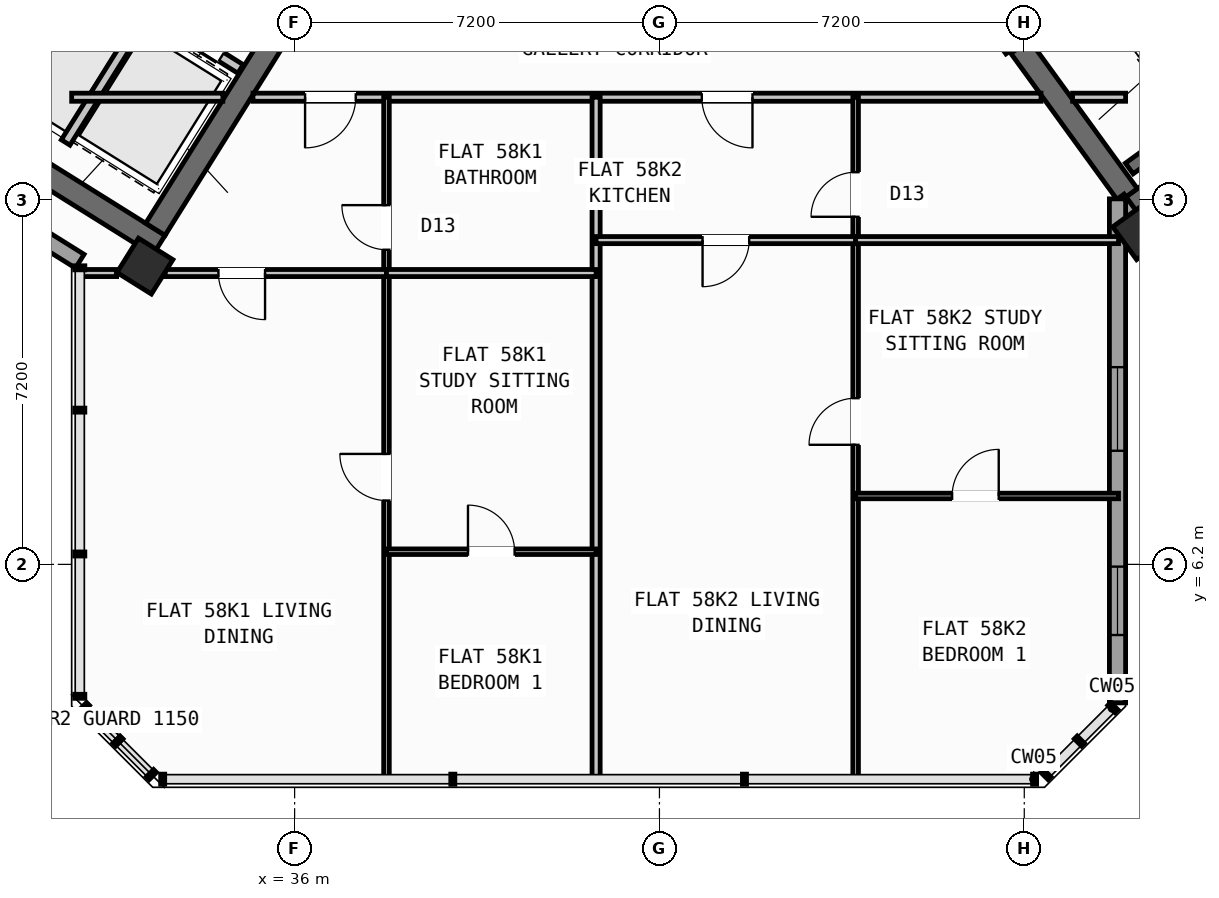
"""IFC4 building model, lengths in metres.
Left out: names, types, materials, properties, quantities, classifications, styles, units other than length and angle.
Written with IfcOpenShell. Run it as: python <this file> out.ifc"""

import sys

from ifc_helpers import new_model, si_unit, direction, frame, frame_2d, origin, origin_2d, place, context, subcontext, project, spatial, rectangle, hollow_rectangle, extrude, source, transform, mapped, element, fill, save


model = new_model("IFC4")
c1 = context("Model", 3, precision=1e-05, world=origin(), true_north=direction((0.0, 1.0)))
c2 = subcontext(c1, "Body", "Model", "MODEL_VIEW")
j1 = project(units=[si_unit("LENGTHUNIT", "METRE"), si_unit("PLANEANGLEUNIT", "RADIAN")], contexts=[c1])
p1 = place(None, origin())
s1 = spatial("IfcSite", under=j1, at=p1, CompositionType="ELEMENT")
p2 = place(p1, origin())
s2 = spatial("IfcBuilding", under=s1, at=p2, CompositionType="ELEMENT")
p3 = place(p2, frame((0.0, 0.0, 229.2)))
s3 = spatial("IfcBuildingStorey", under=s2, at=p3, CompositionType="ELEMENT", Elevation=229.2)
p4 = place(p3, frame((33.324, 12.503, 0.0), z_axis=(0.0, 0.0, 1.0), x_axis=(-0.848043529849, 0.529926571782, 0.0)))
e1 = element("IfcWall", 1, at=p4, inside=s3, PredefinedType="SHEAR", context=c2, shape_type="SweptSolid", body=[
    extrude(rectangle(XDim=13.04, YDim=0.45, at=frame_2d((6.52, 0.0))), origin(), (0.0, 0.0, 1.0), 4.22),
])
p5 = place(p3, frame((36.683, 18.304, 0.0), z_axis=(0.0, 0.0, 1.0), x_axis=(-0.529904039071, -0.848057609704, 0.0)))
e2 = element("IfcWall", 2, at=p5, inside=s3, PredefinedType="SHEAR", context=c2, shape_type="SweptSolid", body=[
    extrude(rectangle(XDim=6.475, YDim=0.45, at=frame_2d((3.238, 0.0))), origin(), (0.0, 0.0, 1.0), 4.22),
])
p6 = place(p3, frame((52.399, 13.169, 0.0), z_axis=(0.0, 0.0, 1.0), x_axis=(0.809022352778, 0.587777877013, 0.0)))
e3 = element("IfcWall", 3, at=p6, inside=s3, PredefinedType="SHEAR", context=c2, shape_type="SweptSolid", body=[
    extrude(rectangle(XDim=12.24, YDim=0.45, at=frame_2d((6.12, 0.0))), origin(), (0.0, 0.0, 1.0), 4.22),
])
p7 = place(p3, frame((52.449, 13.483, 0.0), z_axis=(0.0, 0.0, 1.0), x_axis=(-0.587819244441, 0.808992296542, 0.0)))
e4 = element("IfcWall", 4, at=p7, inside=s3, PredefinedType="SHEAR", context=c2, shape_type="SweptSolid", body=[
    extrude(rectangle(XDim=3.625, YDim=0.45, at=frame_2d((1.812, 0.0))), origin(), (0.0, 0.0, 1.0), 4.22),
])
m1 = source(origin(), c2, "Body", "SweptSolid", [
    extrude(hollow_rectangle(XDim=0.8, YDim=0.8, WallThickness=0.032, at=origin_2d()), origin(), (0.0, 0.0, 1.0), 4.5),
])
for number, where, z_axis, x_axis in (
    (5, (33.046, 12.087, 0.0), (0.0, 0.0, 1.0), (-0.848, 0.53, 0.0)),
    (6, (52.705, 12.773, 0.0), (0.0, 0.0, 1.0), (0.809, 0.588, 0.0)),
):
    element("IfcColumn", number, at=place(p3, frame(where, z_axis=z_axis, x_axis=x_axis)), inside=s3, PredefinedType="COLUMN", context=c2, shape_type="MappedRepresentation", body=[
        mapped(m1, transform((0.0, 0.0, 0.0), scale=1.0)),
    ])
p8 = place(p3, frame((31.76, 12.183, 0.0), z_axis=(0.0, 0.0, 1.0), x_axis=(-0.848047074256, 0.529920899612, 0.0)))
e7 = element("IfcWall", 7, at=p8, inside=s3, PredefinedType="STANDARD", context=c2, shape_type="SweptSolid", body=[
    extrude(rectangle(XDim=30.652, YDim=0.32, at=frame_2d((15.326, 0.0))), origin(), (0.0, 0.0, 1.0), 4.22),
])
p9 = place(p8, frame((14.966, 0.0, 0.0)))
e8 = element("IfcOpeningElement", 8, at=p9, cuts=e7, PredefinedType="OPENING", context=c2, shape_type="SweptSolid", body=[
    extrude(rectangle(XDim=1.2, YDim=2.15, at=frame_2d((0.6, 1.075))), frame((0.0, 0.17, 0.0), z_axis=(0.0, -1.0, 0.0), x_axis=(1.0, 0.0, 0.0)), (0.0, 0.0, 1.0), 0.34),
])
p10 = place(p8, frame((2.096, 0.0, 0.9)))
e9 = element("IfcOpeningElement", 9, at=p10, cuts=e7, PredefinedType="OPENING", context=c2, shape_type="SweptSolid", body=[
    extrude(rectangle(XDim=1.65, YDim=1.45, at=frame_2d((0.825, 0.725))), frame((0.0, 0.17, 0.0), z_axis=(0.0, -1.0, 0.0), x_axis=(1.0, 0.0, 0.0)), (0.0, 0.0, 1.0), 0.34),
])
p11 = place(p8, frame((6.771, 0.0, 0.9)))
e10 = element("IfcOpeningElement", 10, at=p11, cuts=e7, PredefinedType="OPENING", context=c2, shape_type="SweptSolid", body=[
    extrude(rectangle(XDim=1.65, YDim=1.45, at=frame_2d((0.825, 0.725))), frame((0.0, 0.17, 0.0), z_axis=(0.0, -1.0, 0.0), x_axis=(1.0, 0.0, 0.0)), (0.0, 0.0, 1.0), 0.34),
])
p12 = place(p8, frame((20.283, 0.0, 0.95)))
e11 = element("IfcOpeningElement", 11, at=p12, cuts=e7, PredefinedType="OPENING", context=c2, shape_type="SweptSolid", body=[
    extrude(rectangle(XDim=1.95, YDim=1.35, at=frame_2d((0.975, 0.675))), frame((0.0, 0.17, 0.0), z_axis=(0.0, -1.0, 0.0), x_axis=(1.0, 0.0, 0.0)), (0.0, 0.0, 1.0), 0.34),
])
p13 = place(p8, frame((27.208, 0.0, 1.0)))
e12 = element("IfcOpeningElement", 12, at=p13, cuts=e7, PredefinedType="OPENING", context=c2, shape_type="SweptSolid", body=[
    extrude(rectangle(XDim=0.9, YDim=1.25, at=frame_2d((0.45, 0.625))), frame((0.0, 0.17, 0.0), z_axis=(0.0, -1.0, 0.0), x_axis=(1.0, 0.0, 0.0)), (0.0, 0.0, 1.0), 0.34),
])
p14 = place(p3, frame((52.937, 12.455, 0.0), z_axis=(0.0, 0.0, 1.0), x_axis=(-0.587706324018, 0.809074333241, 0.0)))
e13 = element("IfcWall", 13, at=p14, inside=s3, PredefinedType="STANDARD", context=c2, shape_type="SweptSolid", body=[
    extrude(rectangle(XDim=1.186, YDim=0.32, at=frame_2d((0.593, 0.0))), origin(), (0.0, 0.0, 1.0), 2.395),
])
p15 = place(p3, frame((52.24, 13.414, 0.0), z_axis=(0.0, 0.0, 1.0), x_axis=(0.0, -1.0, 0.0)))
e14 = element("IfcWall", 14, at=p15, inside=s3, PredefinedType="STANDARD", context=c2, shape_type="SweptSolid", body=[
    extrude(rectangle(XDim=9.948, YDim=0.32, at=frame_2d((4.974, 0.0))), origin(), (0.0, 0.0, 1.0), 4.22),
])
p16 = place(p15, frame((3.322, 0.0, 0.9)))
e15 = element("IfcOpeningElement", 15, at=p16, cuts=e14, PredefinedType="OPENING", context=c2, shape_type="SweptSolid", body=[
    extrude(rectangle(XDim=1.65, YDim=1.45, at=frame_2d((0.825, 0.725))), frame((0.0, 0.17, 0.0), z_axis=(0.0, -1.0, 0.0), x_axis=(1.0, 0.0, 0.0)), (0.0, 0.0, 1.0), 0.34),
])
p17 = place(p15, frame((7.258, 0.0, 0.9)))
e16 = element("IfcOpeningElement", 16, at=p17, cuts=e14, PredefinedType="OPENING", context=c2, shape_type="SweptSolid", body=[
    extrude(rectangle(XDim=1.35, YDim=1.45, at=frame_2d((0.675, 0.725))), frame((0.0, 0.17, 0.0), z_axis=(0.0, -1.0, 0.0), x_axis=(1.0, 0.0, 0.0)), (0.0, 0.0, 1.0), 0.34),
])
p18 = place(p3, frame((31.288, 18.256, 0.0), z_axis=(0.0, 0.0, 1.0), x_axis=(-0.529943379326, -0.848033026897, 0.0)))
e17 = element("IfcWall", 17, at=p18, inside=s3, PredefinedType="SHEAR", context=c2, shape_type="SweptSolid", body=[
    extrude(rectangle(XDim=3.16, YDim=0.26, at=frame_2d((1.58, 0.0))), origin(), (0.0, 0.0, 1.0), 4.22),
])
p19 = place(p3, frame((34.933, 15.978, 0.0), z_axis=(0.0, 0.0, 1.0), x_axis=(-0.848055739377, 0.529907032327, 0.0)))
e18 = element("IfcWall", 18, at=p19, inside=s3, PredefinedType="STANDARD", context=c2, shape_type="SweptSolid", body=[
    extrude(rectangle(XDim=4.298, YDim=0.2, at=frame_2d((2.149, 0.0))), origin(), (0.0, 0.0, 1.0), 4.21),
])
p20 = place(p19, frame((0.448, 0.0, 0.0)))
e19 = element("IfcOpeningElement", 19, at=p20, cuts=e18, PredefinedType="OPENING", context=c2, shape_type="SweptSolid", body=[
    extrude(rectangle(XDim=1.3, YDim=2.2, at=frame_2d((0.65, 1.1))), frame((0.0, 0.11, 0.0), z_axis=(0.0, -1.0, 0.0), x_axis=(1.0, 0.0, 0.0)), (0.0, 0.0, 1.0), 0.22),
])
p21 = place(p19, frame((2.523, 0.0, 0.0)))
e20 = element("IfcOpeningElement", 20, at=p21, cuts=e18, PredefinedType="OPENING", context=c2, shape_type="SweptSolid", body=[
    extrude(rectangle(XDim=1.45, YDim=2.25, at=frame_2d((0.725, 1.125))), frame((0.0, 0.11, 0.0), z_axis=(0.0, -1.0, 0.0), x_axis=(1.0, 0.0, 0.0)), (0.0, 0.0, 1.0), 0.22),
])
p22 = place(p3, frame((33.029, 17.003, 0.0), z_axis=(0.0, 0.0, 1.0), x_axis=(-0.529916267533, -0.848049968695, 0.0)))
e21 = element("IfcWall", 21, at=p22, inside=s3, PredefinedType="STANDARD", context=c2, shape_type="SweptSolid", body=[
    extrude(rectangle(XDim=2.92, YDim=0.2, at=frame_2d((1.46, 0.0))), origin(), (0.0, 0.0, 1.0), 4.21),
])
p23 = place(p3, frame((52.472, 14.013, 0.0), z_axis=(0.0, 0.0, 1.0), x_axis=(0.809028366311, 0.587769599847, 0.0)))
e22 = element("IfcWall", 22, at=p23, inside=s3, PredefinedType="SHEAR", context=c2, shape_type="SweptSolid", body=[
    extrude(rectangle(XDim=7.33, YDim=0.26, at=frame_2d((3.665, 0.0))), origin(), (0.0, 0.0, 1.0), 4.22),
])
p24 = place(p3, frame((31.6, 15.42, 0.0), z_axis=(0.0, 0.0, 1.0), x_axis=(1.0, 0.0, 0.0)))
e23 = element("IfcWall", 23, at=p24, inside=s3, PredefinedType="PARTITIONING", context=c2, shape_type="SweptSolid", body=[
    extrude(rectangle(XDim=2.984, YDim=0.16, at=frame_2d((1.492, 0.0))), origin(), (0.0, 0.0, 1.0), 4.21),
])
p25 = place(p3, frame((35.178, 15.42, 0.0), z_axis=(0.0, 0.0, 1.0), x_axis=(1.0, 0.0, 0.0)))
e24 = element("IfcWall", 24, at=p25, inside=s3, PredefinedType="PARTITIONING", context=c2, shape_type="SweptSolid", body=[
    extrude(rectangle(XDim=15.552, YDim=0.16, at=frame_2d((7.776, 0.0))), origin(), (0.0, 0.0, 1.0), 4.21),
])
p26 = place(p25, frame((1.028, 0.0, 0.0)))
e25 = element("IfcOpeningElement", 25, at=p26, cuts=e24, PredefinedType="OPENING", context=c2, shape_type="SweptSolid", body=[
    extrude(rectangle(XDim=1.0, YDim=2.1, at=frame_2d((0.5, 1.05))), frame((0.0, 0.09, 0.0), z_axis=(0.0, -1.0, 0.0), x_axis=(1.0, 0.0, 0.0)), (0.0, 0.0, 1.0), 0.18),
])
p27 = place(p25, frame((8.858, 0.0, 0.0)))
e26 = element("IfcOpeningElement", 26, at=p27, cuts=e24, PredefinedType="OPENING", context=c2, shape_type="SweptSolid", body=[
    extrude(rectangle(XDim=1.0, YDim=2.1, at=frame_2d((0.5, 1.05))), frame((0.0, 0.09, 0.0), z_axis=(0.0, -1.0, 0.0), x_axis=(1.0, 0.0, 0.0)), (0.0, 0.0, 1.0), 0.18),
])
p28 = place(p3, frame((51.354, 15.42, 0.0), z_axis=(0.0, 0.0, 1.0), x_axis=(1.0, 0.0, 0.0)))
e27 = element("IfcWall", 27, at=p28, inside=s3, PredefinedType="PARTITIONING", context=c2, shape_type="SweptSolid", body=[
    extrude(rectangle(XDim=1.046, YDim=0.16, at=frame_2d((0.523, 0.0))), origin(), (0.0, 0.0, 1.0), 4.21),
])
p29 = place(p3, frame((50.119, 16.333, 0.0), z_axis=(0.0, 0.0, 1.0), x_axis=(-0.587749856981, 0.809042709391, 0.0)))
e28 = element("IfcWall", 28, at=p29, inside=s3, PredefinedType="STANDARD", context=c2, shape_type="SweptSolid", body=[
    extrude(rectangle(XDim=2.96, YDim=0.2, at=frame_2d((1.48, 0.0))), origin(), (0.0, 0.0, 1.0), 2.395),
])
p30 = place(p29, frame((0.53, 0.0, 0.0)))
e29 = element("IfcOpeningElement", 29, at=p30, cuts=e28, PredefinedType="OPENING", context=c2, shape_type="SweptSolid", body=[
    extrude(rectangle(XDim=1.5, YDim=2.15, at=frame_2d((0.75, 1.075))), frame((0.0, 0.11, 0.0), z_axis=(0.0, -1.0, 0.0), x_axis=(1.0, 0.0, 0.0)), (0.0, 0.0, 1.0), 0.22),
])
p31 = place(p3, frame((41.95, 1.96, 0.0), z_axis=(0.0, 0.0, 1.0), x_axis=(0.0, 1.0, 0.0)))
e30 = element("IfcWall", 30, at=p31, inside=s3, PredefinedType="PARTITIONING", context=c2, shape_type="SweptSolid", body=[
    extrude(rectangle(XDim=13.46, YDim=0.16, at=frame_2d((6.73, 0.0))), origin(), (0.0, 0.0, 1.0), 4.21),
])
p32 = place(p3, frame((37.813, 1.96, 0.0), z_axis=(0.0, 0.0, 1.0), x_axis=(0.0, 1.0, 0.0)))
e31 = element("IfcWall", 31, at=p32, inside=s3, PredefinedType="PARTITIONING", context=c2, shape_type="SweptSolid", body=[
    extrude(rectangle(XDim=13.46, YDim=0.11, at=frame_2d((6.73, 0.0))), origin(), (0.0, 0.0, 1.0), 4.21),
])
p33 = place(p32, frame((5.5, 0.0, 0.0)))
e32 = element("IfcOpeningElement", 32, at=p33, cuts=e31, PredefinedType="OPENING", context=c2, shape_type="SweptSolid", body=[
    extrude(rectangle(XDim=0.92, YDim=2.08, at=frame_2d((0.46, 1.04))), frame((0.0, 0.065, 0.0), z_axis=(0.0, -1.0, 0.0), x_axis=(1.0, 0.0, 0.0)), (0.0, 0.0, 1.0), 0.13),
])
p34 = place(p32, frame((10.45, 0.0, 0.0)))
e33 = element("IfcOpeningElement", 33, at=p34, cuts=e31, PredefinedType="OPENING", context=c2, shape_type="SweptSolid", body=[
    extrude(rectangle(XDim=0.88, YDim=2.08, at=frame_2d((0.44, 1.04))), frame((0.0, 0.065, 0.0), z_axis=(0.0, -1.0, 0.0), x_axis=(1.0, 0.0, 0.0)), (0.0, 0.0, 1.0), 0.13),
])
p35 = place(p3, frame((31.74, 11.95, 0.0), z_axis=(0.0, 0.0, 1.0), x_axis=(1.0, 0.0, 0.0)))
e34 = element("IfcWall", 34, at=p35, inside=s3, PredefinedType="PLUMBINGWALL", context=c2, shape_type="SweptSolid", body=[
    extrude(rectangle(XDim=0.748, YDim=0.14, at=frame_2d((0.374, 0.0))), origin(), (0.0, 0.0, 1.0), 4.21),
])
p36 = place(p3, frame((33.447, 11.95, 0.0), z_axis=(0.0, 0.0, 1.0), x_axis=(1.0, 0.0, 0.0)))
e35 = element("IfcWall", 35, at=p36, inside=s3, PredefinedType="PLUMBINGWALL", context=c2, shape_type="SweptSolid", body=[
    extrude(rectangle(XDim=4.366, YDim=0.14, at=frame_2d((2.183, 0.0))), origin(), (0.0, 0.0, 1.0), 3.395),
])
p37 = place(p36, frame((1.05, 0.0, 0.0)))
e36 = element("IfcOpeningElement", 36, at=p37, cuts=e35, PredefinedType="OPENING", context=c2, shape_type="SweptSolid", body=[
    extrude(rectangle(XDim=0.92, YDim=2.08, at=frame_2d((0.46, 1.04))), frame((0.0, 0.08, 0.0), z_axis=(0.0, -1.0, 0.0), x_axis=(1.0, 0.0, 0.0)), (0.0, 0.0, 1.0), 0.16),
])
p38 = place(p3, frame((37.813, 11.95, 0.0), z_axis=(0.0, 0.0, 1.0), x_axis=(1.0, 0.0, 0.0)))
e37 = element("IfcWall", 37, at=p38, inside=s3, PredefinedType="PLUMBINGWALL", context=c2, shape_type="SweptSolid", body=[
    extrude(rectangle(XDim=4.137, YDim=0.14, at=frame_2d((2.068, 0.0))), origin(), (0.0, 0.0, 1.0), 3.395),
])
p39 = place(p3, frame((37.813, 6.45, 0.0), z_axis=(0.0, 0.0, 1.0), x_axis=(1.0, 0.0, 0.0)))
e38 = element("IfcWall", 38, at=p39, inside=s3, PredefinedType="PARTITIONING", context=c2, shape_type="SweptSolid", body=[
    extrude(rectangle(XDim=4.137, YDim=0.11, at=frame_2d((2.068, 0.0))), origin(), (0.0, 0.0, 1.0), 4.21),
])
p40 = place(p39, frame((1.608, 0.0, 0.0)))
e39 = element("IfcOpeningElement", 39, at=p40, cuts=e38, PredefinedType="OPENING", context=c2, shape_type="SweptSolid", body=[
    extrude(rectangle(XDim=0.92, YDim=2.08, at=frame_2d((0.46, 1.04))), frame((0.0, 0.065, 0.0), z_axis=(0.0, -1.0, 0.0), x_axis=(1.0, 0.0, 0.0)), (0.0, 0.0, 1.0), 0.13),
])
p41 = place(p3, frame((47.072, 1.96, 0.0), z_axis=(0.0, 0.0, 1.0), x_axis=(0.0, 1.0, 0.0)))
e40 = element("IfcWall", 40, at=p41, inside=s3, PredefinedType="PARTITIONING", context=c2, shape_type="SweptSolid", body=[
    extrude(rectangle(XDim=13.46, YDim=0.11, at=frame_2d((6.73, 0.0))), origin(), (0.0, 0.0, 1.0), 4.21),
])
p42 = place(p41, frame((6.6, 0.0, 0.0)))
e41 = element("IfcOpeningElement", 41, at=p42, cuts=e40, PredefinedType="OPENING", context=c2, shape_type="SweptSolid", body=[
    extrude(rectangle(XDim=0.92, YDim=2.08, at=frame_2d((0.46, 1.04))), frame((0.0, 0.065, 0.0), z_axis=(0.0, -1.0, 0.0), x_axis=(1.0, 0.0, 0.0)), (0.0, 0.0, 1.0), 0.13),
])
p43 = place(p41, frame((11.1, 0.0, 0.0)))
e42 = element("IfcOpeningElement", 42, at=p43, cuts=e40, PredefinedType="OPENING", context=c2, shape_type="SweptSolid", body=[
    extrude(rectangle(XDim=0.88, YDim=2.08, at=frame_2d((0.44, 1.04))), frame((0.0, 0.065, 0.0), z_axis=(0.0, -1.0, 0.0), x_axis=(1.0, 0.0, 0.0)), (0.0, 0.0, 1.0), 0.13),
])
p44 = place(p3, frame((41.95, 12.6, 0.0), z_axis=(0.0, 0.0, 1.0), x_axis=(1.0, 0.0, 0.0)))
e43 = element("IfcWall", 43, at=p44, inside=s3, PredefinedType="PLUMBINGWALL", context=c2, shape_type="SweptSolid", body=[
    extrude(rectangle(XDim=5.122, YDim=0.14, at=frame_2d((2.561, 0.0))), origin(), (0.0, 0.0, 1.0), 3.395),
])
p45 = place(p44, frame((2.101, 0.0, 0.0)))
e44 = element("IfcOpeningElement", 44, at=p45, cuts=e43, PredefinedType="OPENING", context=c2, shape_type="SweptSolid", body=[
    extrude(rectangle(XDim=0.92, YDim=2.08, at=frame_2d((0.46, 1.04))), frame((0.0, 0.08, 0.0), z_axis=(0.0, -1.0, 0.0), x_axis=(1.0, 0.0, 0.0)), (0.0, 0.0, 1.0), 0.16),
])
p46 = place(p3, frame((47.072, 12.6, 0.0), z_axis=(0.0, 0.0, 1.0), x_axis=(1.0, 0.0, 0.0)))
e45 = element("IfcWall", 45, at=p46, inside=s3, PredefinedType="PLUMBINGWALL", context=c2, shape_type="SweptSolid", body=[
    extrude(rectangle(XDim=5.188, YDim=0.14, at=frame_2d((2.594, 0.0))), origin(), (0.0, 0.0, 1.0), 3.395),
])
p47 = place(p3, frame((47.072, 7.55, 0.0), z_axis=(0.0, 0.0, 1.0), x_axis=(1.0, 0.0, 0.0)))
e46 = element("IfcWall", 46, at=p47, inside=s3, PredefinedType="PARTITIONING", context=c2, shape_type="SweptSolid", body=[
    extrude(rectangle(XDim=5.188, YDim=0.11, at=frame_2d((2.594, 0.0))), origin(), (0.0, 0.0, 1.0), 4.21),
])
p48 = place(p47, frame((1.904, 0.0, 0.0)))
e47 = element("IfcOpeningElement", 47, at=p48, cuts=e46, PredefinedType="OPENING", context=c2, shape_type="SweptSolid", body=[
    extrude(rectangle(XDim=0.92, YDim=2.08, at=frame_2d((0.46, 1.04))), frame((0.0, 0.065, 0.0), z_axis=(0.0, -1.0, 0.0), x_axis=(1.0, 0.0, 0.0)), (0.0, 0.0, 1.0), 0.13),
])
m2 = source(origin(), c2, "Body", "SweptSolid", [
    extrude(rectangle(XDim=1.65, YDim=1.45, at=frame_2d((0.825, 0.725))), frame((0.0, 0.03, 0.0), z_axis=(0.0, -1.0, 0.0), x_axis=(1.0, 0.0, 0.0)), (0.0, 0.0, 1.0), 0.06),
])
p49 = place(p16, origin())
e48 = element("IfcWindow", 48, at=p49, inside=s3, PartitioningType="SINGLE_PANEL", PredefinedType="WINDOW", context=c2, shape_type="MappedRepresentation", body=[
    mapped(m2, transform((0.0, 0.0, 0.0), scale=1.0)),
])
fill(e15, e48)
m3 = source(origin(), c2, "Body", "SweptSolid", [
    extrude(rectangle(XDim=1.35, YDim=1.45, at=frame_2d((0.675, 0.725))), frame((0.0, 0.03, 0.0), z_axis=(0.0, -1.0, 0.0), x_axis=(1.0, 0.0, 0.0)), (0.0, 0.0, 1.0), 0.06),
])
p50 = place(p17, origin())
e49 = element("IfcWindow", 49, at=p50, inside=s3, PartitioningType="SINGLE_PANEL", PredefinedType="WINDOW", context=c2, shape_type="MappedRepresentation", body=[
    mapped(m3, transform((0.0, 0.0, 0.0), scale=1.0)),
])
fill(e16, e49)
m4 = source(origin(), c2, "Body", "SweptSolid", [
    extrude(rectangle(XDim=1.3, YDim=2.2, at=frame_2d((0.65, 1.1))), frame((0.0, 0.025, 0.0), z_axis=(0.0, -1.0, 0.0), x_axis=(1.0, 0.0, 0.0)), (0.0, 0.0, 1.0), 0.05),
])
p51 = place(p20, origin())
e50 = element("IfcDoor", 50, at=p51, inside=s3, OperationType="DOUBLE_DOOR_SLIDING", PredefinedType="DOOR", context=c2, shape_type="MappedRepresentation", body=[
    mapped(m4, transform((0.0, 0.0, 0.0), scale=1.0)),
])
fill(e19, e50)
m5 = source(origin(), c2, "Body", "SweptSolid", [
    extrude(rectangle(XDim=0.92, YDim=2.08, at=frame_2d((0.46, 1.04))), frame((0.0, 0.025, 0.0), z_axis=(0.0, -1.0, 0.0), x_axis=(1.0, 0.0, 0.0)), (0.0, 0.0, 1.0), 0.05),
])
p52 = place(p33, origin())
e51 = element("IfcDoor", 51, at=p52, inside=s3, OperationType="SINGLE_SWING_RIGHT", PredefinedType="DOOR", context=c2, shape_type="MappedRepresentation", body=[
    mapped(m5, transform((0.0, 0.0, 0.0), scale=1.0)),
])
fill(e32, e51)
p53 = place(p40, origin())
e52 = element("IfcDoor", 52, at=p53, inside=s3, OperationType="SINGLE_SWING_LEFT", PredefinedType="DOOR", context=c2, shape_type="MappedRepresentation", body=[
    mapped(m5, transform((0.0, 0.0, 0.0), scale=1.0)),
])
fill(e39, e52)
m6 = source(origin(), c2, "Body", "SweptSolid", [
    extrude(rectangle(XDim=1.0, YDim=2.1, at=frame_2d((0.5, 1.05))), frame((0.0, 0.025, 0.0), z_axis=(0.0, -1.0, 0.0), x_axis=(1.0, 0.0, 0.0)), (0.0, 0.0, 1.0), 0.05),
])
p54 = place(p26, frame((1.0, 0.0, 0.0), z_axis=(0.0, 0.0, 1.0), x_axis=(-1.0, 0.0, 0.0)))
e53 = element("IfcDoor", 53, at=p54, inside=s3, OperationType="SINGLE_SWING_RIGHT", PredefinedType="DOOR", context=c2, shape_type="MappedRepresentation", body=[
    mapped(m6, transform((0.0, 0.0, 0.0), scale=1.0)),
])
fill(e25, e53)
p55 = place(p37, frame((0.92, 0.0, 0.0), z_axis=(0.0, 0.0, 1.0), x_axis=(-1.0, 0.0, 0.0)))
e54 = element("IfcDoor", 54, at=p55, inside=s3, OperationType="SINGLE_SWING_LEFT", PredefinedType="DOOR", context=c2, shape_type="MappedRepresentation", body=[
    mapped(m5, transform((0.0, 0.0, 0.0), scale=1.0)),
])
fill(e36, e54)
m7 = source(origin(), c2, "Body", "SweptSolid", [
    extrude(rectangle(XDim=0.88, YDim=2.08, at=frame_2d((0.44, 1.04))), frame((0.0, 0.025, 0.0), z_axis=(0.0, -1.0, 0.0), x_axis=(1.0, 0.0, 0.0)), (0.0, 0.0, 1.0), 0.05),
])
p56 = place(p34, origin())
e55 = element("IfcDoor", 55, at=p56, inside=s3, OperationType="SINGLE_SWING_RIGHT", PredefinedType="DOOR", context=c2, shape_type="MappedRepresentation", body=[
    mapped(m7, transform((0.0, 0.0, 0.0), scale=1.0)),
])
fill(e33, e55)
p57 = place(p42, origin())
e56 = element("IfcDoor", 56, at=p57, inside=s3, OperationType="SINGLE_SWING_LEFT", PredefinedType="DOOR", context=c2, shape_type="MappedRepresentation", body=[
    mapped(m5, transform((0.0, 0.0, 0.0), scale=1.0)),
])
fill(e41, e56)
p58 = place(p48, origin())
e57 = element("IfcDoor", 57, at=p58, inside=s3, OperationType="SINGLE_SWING_RIGHT", PredefinedType="DOOR", context=c2, shape_type="MappedRepresentation", body=[
    mapped(m5, transform((0.0, 0.0, 0.0), scale=1.0)),
])
fill(e47, e57)
p59 = place(p27, frame((1.0, 0.0, 0.0), z_axis=(0.0, 0.0, 1.0), x_axis=(-1.0, 0.0, 0.0)))
e58 = element("IfcDoor", 58, at=p59, inside=s3, OperationType="SINGLE_SWING_LEFT", PredefinedType="DOOR", context=c2, shape_type="MappedRepresentation", body=[
    mapped(m6, transform((0.0, 0.0, 0.0), scale=1.0)),
])
fill(e26, e58)
p60 = place(p45, frame((0.92, 0.0, 0.0), z_axis=(0.0, 0.0, 1.0), x_axis=(-1.0, 0.0, 0.0)))
e59 = element("IfcDoor", 59, at=p60, inside=s3, OperationType="SINGLE_SWING_RIGHT", PredefinedType="DOOR", context=c2, shape_type="MappedRepresentation", body=[
    mapped(m5, transform((0.0, 0.0, 0.0), scale=1.0)),
])
fill(e44, e59)
p61 = place(p43, origin())
e60 = element("IfcDoor", 60, at=p61, inside=s3, OperationType="SINGLE_SWING_LEFT", PredefinedType="DOOR", context=c2, shape_type="MappedRepresentation", body=[
    mapped(m7, transform((0.0, 0.0, 0.0), scale=1.0)),
])
fill(e42, e60)
save(model, sys.argv[1])
